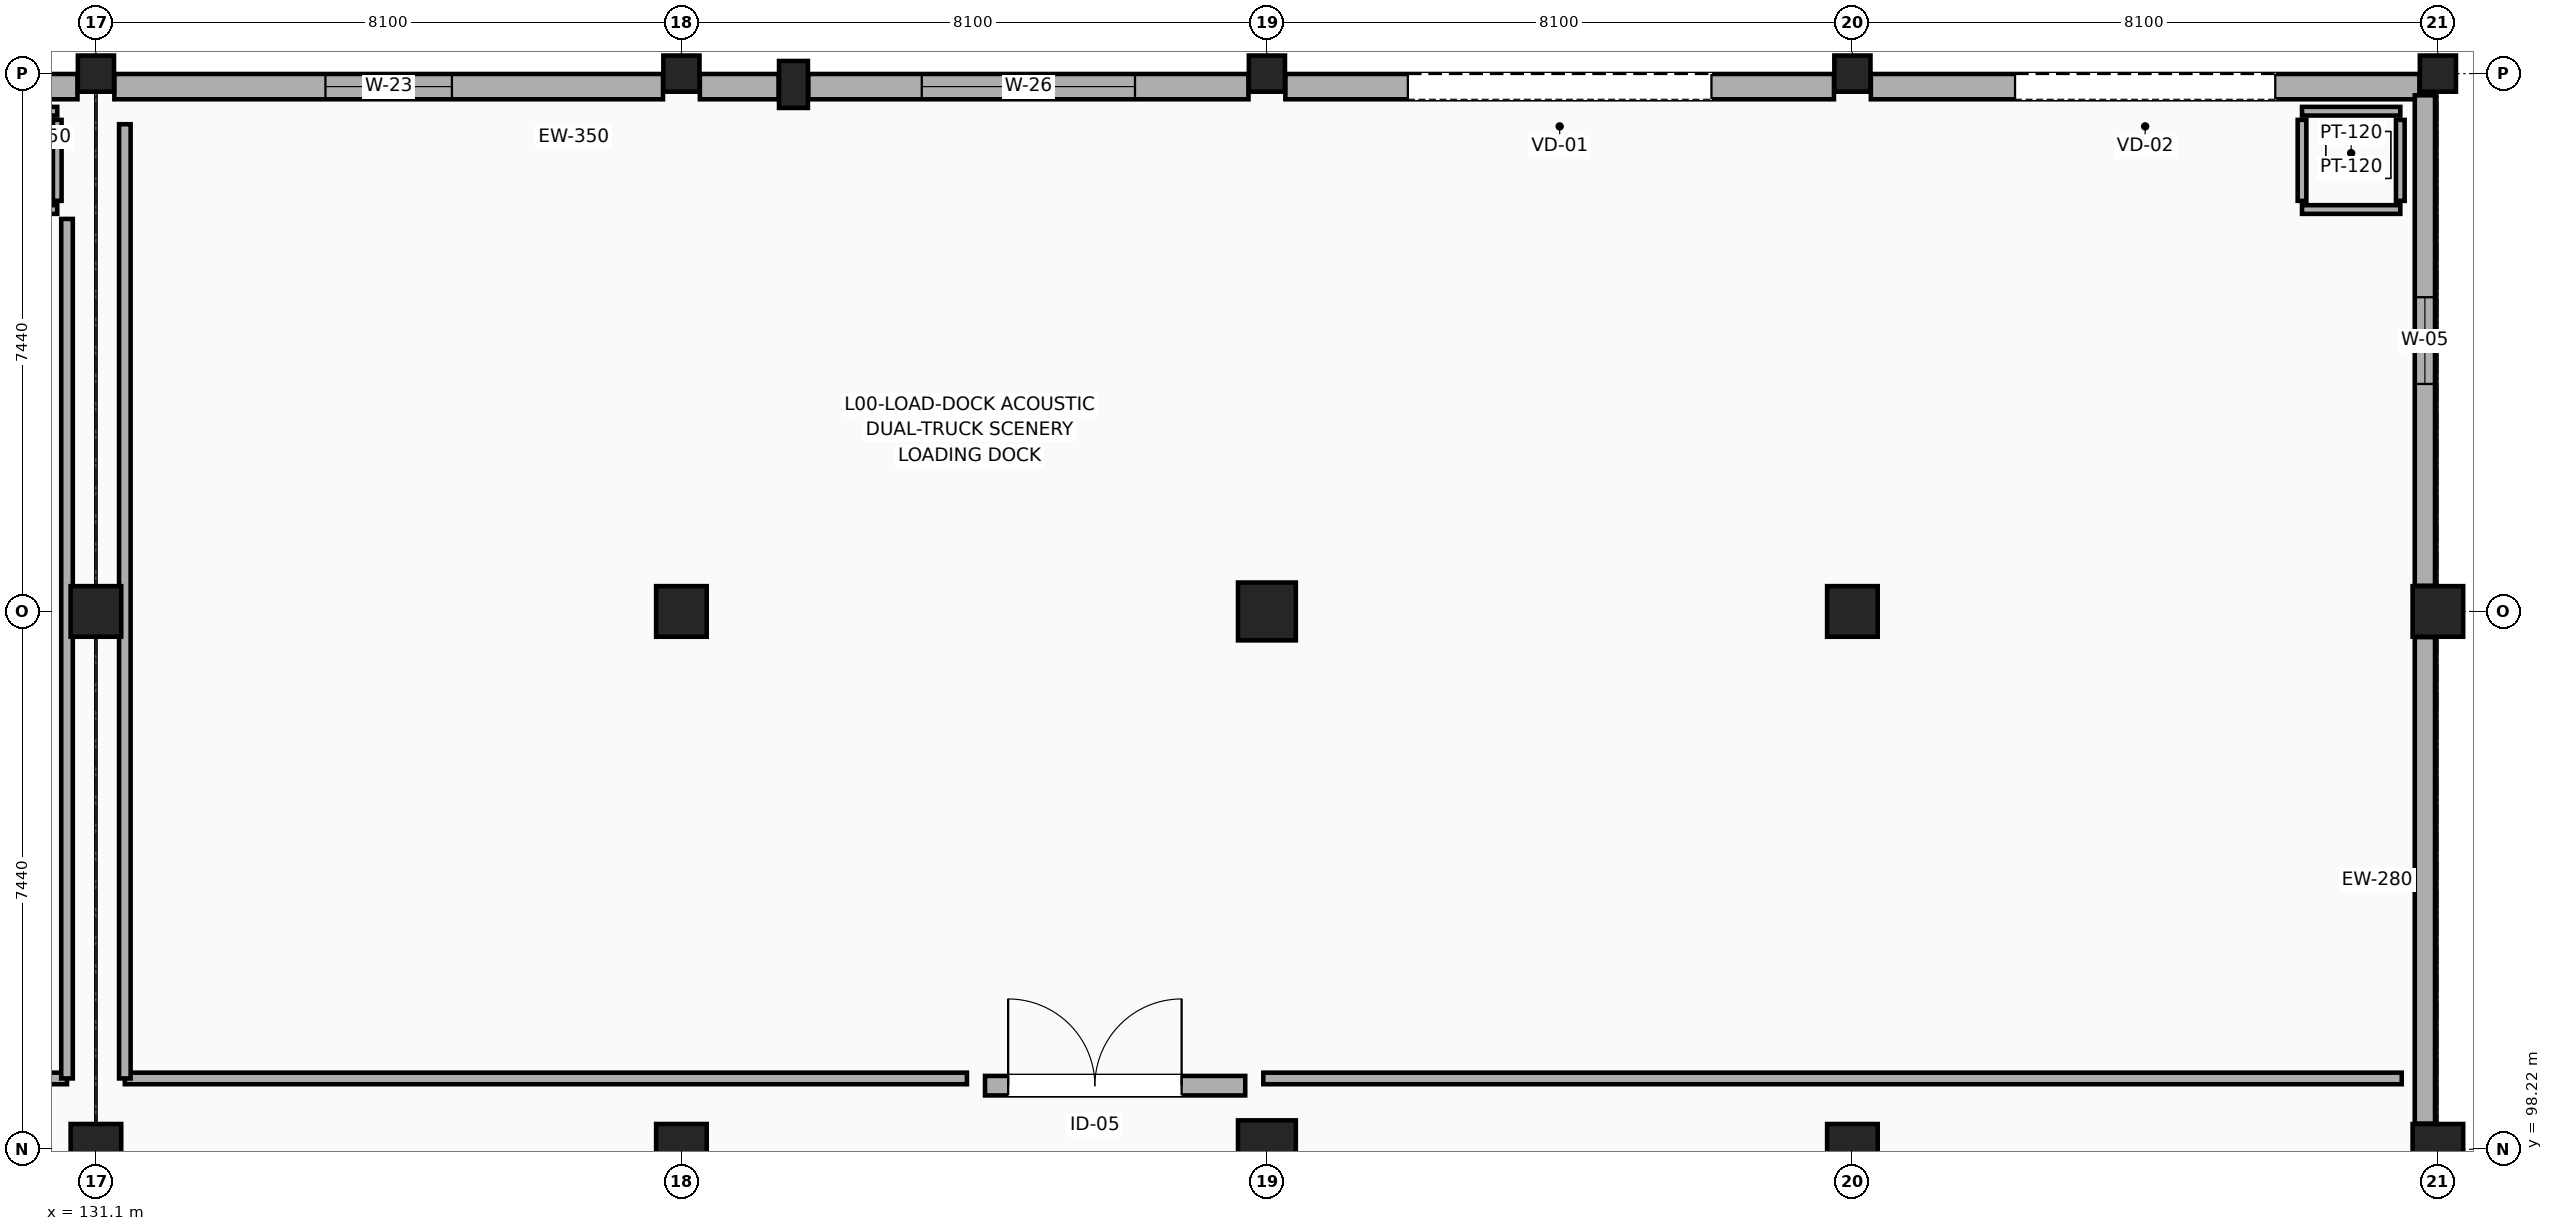
"""IFC4 building model, lengths in metres.
Left out: names, types, materials, properties, quantities, classifications, styles, units other than length and angle.
Written with IfcOpenShell. Run it as: python <this file> out.ifc"""

import sys

from ifc_helpers import new_model, si_unit, direction, frame, frame_2d, origin, origin_2d, place, context, subcontext, project, spatial, rectangle, extrude, element, fill, save


model = new_model("IFC4")
c1 = context("Model", 3, precision=1e-05, world=origin(), true_north=direction((0.0, 1.0)))
c2 = subcontext(c1, "Body", "Model", "MODEL_VIEW")
j1 = project(units=[si_unit("LENGTHUNIT", "METRE"), si_unit("PLANEANGLEUNIT", "RADIAN")], contexts=[c1])
p1 = place(None, origin())
s1 = spatial("IfcSite", under=j1, at=p1, CompositionType="ELEMENT")
p2 = place(p1, origin())
s2 = spatial("IfcBuilding", under=s1, at=p2, CompositionType="ELEMENT")
p3 = place(p2, origin())
s3 = spatial("IfcBuildingStorey", under=s2, at=p3, CompositionType="ELEMENT", Elevation=0.0)
p4 = place(p3, frame((140.75, 112.95, 0.0), z_axis=(0.0, 0.0, 1.0), x_axis=(1.0, 0.0, 0.0)))
e1 = element("IfcColumn", 1, at=p4, inside=s3, PredefinedType="PILASTER", context=c2, shape_type="SweptSolid", body=[
    extrude(rectangle(XDim=0.4, YDim=0.65, at=origin_2d()), origin(), (0.0, 0.0, 1.0), 5.4),
])
for number, where, z_axis, x_axis in (
    (2, (131.1, 98.22, 0.0), (0.0, 0.0, 1.0), (1.0, 0.0, 0.0)),
    (3, (131.1, 105.66, 0.0), (0.0, 0.0, 1.0), (1.0, 0.0, 0.0)),
):
    element("IfcColumn", number, at=place(p3, frame(where, z_axis=z_axis, x_axis=x_axis)), inside=s3, PredefinedType="COLUMN", context=c2, shape_type="SweptSolid", body=[
        extrude(rectangle(XDim=0.7, YDim=0.7, at=origin_2d()), origin(), (0.0, 0.0, 1.0), 5.4),
    ])
p5 = place(p3, frame((131.1, 113.1, 0.0), z_axis=(0.0, 0.0, 1.0), x_axis=(1.0, 0.0, 0.0)))
e4 = element("IfcColumn", 4, at=p5, inside=s3, PredefinedType="COLUMN", context=c2, shape_type="SweptSolid", body=[
    extrude(rectangle(XDim=0.5, YDim=0.5, at=origin_2d()), origin(), (0.0, 0.0, 1.0), 5.4),
])
for number, where, z_axis, x_axis in (
    (5, (139.2, 98.22, 0.0), (0.0, 0.0, 1.0), (1.0, 0.0, 0.0)),
    (6, (139.2, 105.66, 0.0), (0.0, 0.0, 1.0), (1.0, 0.0, 0.0)),
):
    element("IfcColumn", number, at=place(p3, frame(where, z_axis=z_axis, x_axis=x_axis)), inside=s3, PredefinedType="COLUMN", context=c2, shape_type="SweptSolid", body=[
        extrude(rectangle(XDim=0.7, YDim=0.7, at=origin_2d()), origin(), (0.0, 0.0, 1.0), 5.4),
    ])
p6 = place(p3, frame((139.2, 113.1, 0.0), z_axis=(0.0, 0.0, 1.0), x_axis=(1.0, 0.0, 0.0)))
e7 = element("IfcColumn", 7, at=p6, inside=s3, PredefinedType="COLUMN", context=c2, shape_type="SweptSolid", body=[
    extrude(rectangle(XDim=0.5, YDim=0.5, at=origin_2d()), origin(), (0.0, 0.0, 1.0), 5.4),
])
for number, where, z_axis, x_axis in (
    (8, (147.3, 98.22, 0.0), (0.0, 0.0, 1.0), (1.0, 0.0, 0.0)),
    (9, (147.3, 105.66, 0.0), (0.0, 0.0, 1.0), (1.0, 0.0, 0.0)),
):
    element("IfcColumn", number, at=place(p3, frame(where, z_axis=z_axis, x_axis=x_axis)), inside=s3, PredefinedType="COLUMN", context=c2, shape_type="SweptSolid", body=[
        extrude(rectangle(XDim=0.8, YDim=0.8, at=origin_2d()), origin(), (0.0, 0.0, 1.0), 5.4),
    ])
p7 = place(p3, frame((147.3, 113.1, 0.0), z_axis=(0.0, 0.0, 1.0), x_axis=(1.0, 0.0, 0.0)))
e10 = element("IfcColumn", 10, at=p7, inside=s3, PredefinedType="COLUMN", context=c2, shape_type="SweptSolid", body=[
    extrude(rectangle(XDim=0.5, YDim=0.5, at=origin_2d()), origin(), (0.0, 0.0, 1.0), 5.4),
])
for number, where, z_axis, x_axis in (
    (11, (155.4, 98.22, 0.0), (0.0, 0.0, 1.0), (1.0, 0.0, 0.0)),
    (12, (155.4, 105.66, 0.0), (0.0, 0.0, 1.0), (1.0, 0.0, 0.0)),
):
    element("IfcColumn", number, at=place(p3, frame(where, z_axis=z_axis, x_axis=x_axis)), inside=s3, PredefinedType="COLUMN", context=c2, shape_type="SweptSolid", body=[
        extrude(rectangle(XDim=0.7, YDim=0.7, at=origin_2d()), origin(), (0.0, 0.0, 1.0), 5.4),
    ])
p8 = place(p3, frame((155.4, 113.1, 0.0), z_axis=(0.0, 0.0, 1.0), x_axis=(1.0, 0.0, 0.0)))
e13 = element("IfcColumn", 13, at=p8, inside=s3, PredefinedType="COLUMN", context=c2, shape_type="SweptSolid", body=[
    extrude(rectangle(XDim=0.5, YDim=0.5, at=origin_2d()), origin(), (0.0, 0.0, 1.0), 5.4),
])
for number, where, z_axis, x_axis in (
    (14, (163.5, 98.22, 0.0), (0.0, 0.0, 1.0), (1.0, 0.0, 0.0)),
    (15, (163.5, 105.66, 0.0), (0.0, 0.0, 1.0), (1.0, 0.0, 0.0)),
):
    element("IfcColumn", number, at=place(p3, frame(where, z_axis=z_axis, x_axis=x_axis)), inside=s3, PredefinedType="COLUMN", context=c2, shape_type="SweptSolid", body=[
        extrude(rectangle(XDim=0.7, YDim=0.7, at=origin_2d()), origin(), (0.0, 0.0, 1.0), 5.4),
    ])
p9 = place(p3, frame((163.5, 113.1, 0.0), z_axis=(0.0, 0.0, 1.0), x_axis=(1.0, 0.0, 0.0)))
e16 = element("IfcColumn", 16, at=p9, inside=s3, PredefinedType="COLUMN", context=c2, shape_type="SweptSolid", body=[
    extrude(rectangle(XDim=0.5, YDim=0.5, at=origin_2d()), origin(), (0.0, 0.0, 1.0), 5.4),
])
p10 = place(p3, frame((124.78, 112.92, 0.0), z_axis=(0.0, 0.0, 1.0), x_axis=(1.0, 0.0, 0.0)))
e17 = element("IfcWall", 17, at=p10, inside=s3, PredefinedType="SOLIDWALL", context=c2, shape_type="SweptSolid", body=[
    extrude(rectangle(XDim=6.065, YDim=0.35, at=frame_2d((3.032, 0.0))), origin(), (0.0, 0.0, 1.0), 4.137),
])
p11 = place(p10, frame((1.607, 0.0, 0.9)))
e18 = element("IfcOpeningElement", 18, at=p11, cuts=e17, PredefinedType="OPENING", context=c2, shape_type="SweptSolid", body=[
    extrude(rectangle(XDim=2.85, YDim=1.65, at=frame_2d((1.425, 0.825))), frame((0.0, 0.185, 0.0), z_axis=(0.0, -1.0, 0.0), x_axis=(1.0, 0.0, 0.0)), (0.0, 0.0, 1.0), 0.37),
])
p12 = place(p3, frame((131.355, 112.92, 0.0), z_axis=(0.0, 0.0, 1.0), x_axis=(1.0, 0.0, 0.0)))
e19 = element("IfcWall", 19, at=p12, inside=s3, PredefinedType="SOLIDWALL", context=c2, shape_type="SweptSolid", body=[
    extrude(rectangle(XDim=7.59, YDim=0.35, at=frame_2d((3.795, 0.0))), origin(), (0.0, 0.0, 1.0), 4.137),
])
p13 = place(p12, frame((2.92, 0.0, 0.9)))
e20 = element("IfcOpeningElement", 20, at=p13, cuts=e19, PredefinedType="OPENING", context=c2, shape_type="SweptSolid", body=[
    extrude(rectangle(XDim=1.75, YDim=1.8, at=frame_2d((0.875, 0.9))), frame((0.0, 0.185, 0.0), z_axis=(0.0, -1.0, 0.0), x_axis=(1.0, 0.0, 0.0)), (0.0, 0.0, 1.0), 0.37),
])
p14 = place(p3, frame((140.955, 112.92, 0.0), z_axis=(0.0, 0.0, 1.0), x_axis=(1.0, 0.0, 0.0)))
e21 = element("IfcWall", 21, at=p14, inside=s3, PredefinedType="SOLIDWALL", context=c2, shape_type="SweptSolid", body=[
    extrude(rectangle(XDim=6.09, YDim=0.35, at=frame_2d((3.045, 0.0))), origin(), (0.0, 0.0, 1.0), 4.137),
])
p15 = place(p14, frame((1.57, 0.0, 0.9)))
e22 = element("IfcOpeningElement", 22, at=p15, cuts=e21, PredefinedType="OPENING", context=c2, shape_type="SweptSolid", body=[
    extrude(rectangle(XDim=2.95, YDim=1.95, at=frame_2d((1.475, 0.975))), frame((0.0, 0.185, 0.0), z_axis=(0.0, -1.0, 0.0), x_axis=(1.0, 0.0, 0.0)), (0.0, 0.0, 1.0), 0.37),
])
p16 = place(p3, frame((139.455, 112.92, 0.0), z_axis=(0.0, 0.0, 1.0), x_axis=(1.0, 0.0, 0.0)))
e23 = element("IfcWall", 23, at=p16, inside=s3, PredefinedType="SOLIDWALL", context=c2, shape_type="SweptSolid", body=[
    extrude(rectangle(XDim=1.09, YDim=0.35, at=frame_2d((0.545, 0.0))), origin(), (0.0, 0.0, 1.0), 4.137),
])
p17 = place(p3, frame((147.555, 112.92, 0.0), z_axis=(0.0, 0.0, 1.0), x_axis=(1.0, 0.0, 0.0)))
e24 = element("IfcWall", 24, at=p17, inside=s3, PredefinedType="SOLIDWALL", context=c2, shape_type="SweptSolid", body=[
    extrude(rectangle(XDim=7.59, YDim=0.35, at=frame_2d((3.795, 0.0))), origin(), (0.0, 0.0, 1.0), 4.137),
])
p18 = place(p17, frame((1.695, 0.0, 0.0)))
e25 = element("IfcOpeningElement", 25, at=p18, cuts=e24, PredefinedType="OPENING", context=c2, shape_type="SweptSolid", body=[
    extrude(rectangle(XDim=4.2, YDim=3.6, at=frame_2d((2.1, 1.8))), frame((0.0, 0.185, 0.0), z_axis=(0.0, -1.0, 0.0), x_axis=(1.0, 0.0, 0.0)), (0.0, 0.0, 1.0), 0.37),
])
p19 = place(p3, frame((155.655, 112.92, 0.0), z_axis=(0.0, 0.0, 1.0), x_axis=(1.0, 0.0, 0.0)))
e26 = element("IfcWall", 26, at=p19, inside=s3, PredefinedType="SOLIDWALL", context=c2, shape_type="SweptSolid", body=[
    extrude(rectangle(XDim=7.59, YDim=0.35, at=frame_2d((3.795, 0.0))), origin(), (0.0, 0.0, 1.0), 4.137),
])
p20 = place(p19, frame((1.995, 0.0, 0.0)))
e27 = element("IfcOpeningElement", 27, at=p20, cuts=e26, PredefinedType="OPENING", context=c2, shape_type="SweptSolid", body=[
    extrude(rectangle(XDim=3.6, YDim=3.4, at=frame_2d((1.8, 1.7))), frame((0.0, 0.185, 0.0), z_axis=(0.0, -1.0, 0.0), x_axis=(1.0, 0.0, 0.0)), (0.0, 0.0, 1.0), 0.37),
])
p21 = place(p3, frame((163.32, 98.575, 0.0), z_axis=(0.0, 0.0, 1.0), x_axis=(0.0, 1.0, 0.0)))
e28 = element("IfcWall", 28, at=p21, inside=s3, PredefinedType="SOLIDWALL", context=c2, shape_type="SweptSolid", body=[
    extrude(rectangle(XDim=6.73, YDim=0.28, at=frame_2d((3.365, 0.0))), origin(), (0.0, 0.0, 1.0), 4.787),
])
p22 = place(p3, frame((163.32, 106.015, 0.0), z_axis=(0.0, 0.0, 1.0), x_axis=(0.0, 1.0, 0.0)))
e29 = element("IfcWall", 29, at=p22, inside=s3, PredefinedType="SOLIDWALL", context=c2, shape_type="SweptSolid", body=[
    extrude(rectangle(XDim=6.785, YDim=0.28, at=frame_2d((3.393, 0.0))), origin(), (0.0, 0.0, 1.0), 4.787),
])
p23 = place(p22, frame((2.792, 0.0, 0.95)))
e30 = element("IfcOpeningElement", 30, at=p23, cuts=e29, PredefinedType="OPENING", context=c2, shape_type="SweptSolid", body=[
    extrude(rectangle(XDim=1.2, YDim=1.8, at=frame_2d((0.6, 0.9))), frame((0.0, 0.15, 0.0), z_axis=(0.0, -1.0, 0.0), x_axis=(1.0, 0.0, 0.0)), (0.0, 0.0, 1.0), 0.3),
])
for number, where, z_axis, x_axis in (
    (31, (129.205, 111.22, 0.0), (0.0, 0.0, 1.0), (1.0, 0.0, 0.0)),
    (32, (129.205, 112.58, 0.0), (0.0, 0.0, 1.0), (1.0, 0.0, 0.0)),
):
    element("IfcWall", number, at=place(p3, frame(where, z_axis=z_axis, x_axis=x_axis)), inside=s3, PredefinedType="PARTITIONING", context=c2, shape_type="SweptSolid", body=[
        extrude(rectangle(XDim=1.36, YDim=0.12, at=frame_2d((0.68, 0.0))), origin(), (0.0, 0.0, 1.0), 5.085),
    ])
p24 = place(p3, frame((130.565, 111.34, 0.0), z_axis=(0.0, 0.0, 1.0), x_axis=(0.0, 1.0, 0.0)))
e33 = element("IfcWall", 33, at=p24, inside=s3, PredefinedType="PARTITIONING", context=c2, shape_type="SweptSolid", body=[
    extrude(rectangle(XDim=1.12, YDim=0.12, at=frame_2d((0.56, 0.0))), origin(), (0.0, 0.0, 1.0), 5.085),
])
for number, where, z_axis, x_axis in (
    (34, (161.62, 111.22, 0.0), (0.0, 0.0, 1.0), (1.0, 0.0, 0.0)),
    (35, (161.62, 112.58, 0.0), (0.0, 0.0, 1.0), (1.0, 0.0, 0.0)),
):
    element("IfcWall", number, at=place(p3, frame(where, z_axis=z_axis, x_axis=x_axis)), inside=s3, PredefinedType="PARTITIONING", context=c2, shape_type="SweptSolid", body=[
        extrude(rectangle(XDim=1.36, YDim=0.12, at=frame_2d((0.68, 0.0))), origin(), (0.0, 0.0, 1.0), 5.085),
    ])
for number, where, z_axis, x_axis in (
    (36, (161.62, 111.34, 0.0), (0.0, 0.0, 1.0), (0.0, 1.0, 0.0)),
    (37, (162.98, 111.34, 0.0), (0.0, 0.0, 1.0), (0.0, 1.0, 0.0)),
):
    element("IfcWall", number, at=place(p3, frame(where, z_axis=z_axis, x_axis=x_axis)), inside=s3, PredefinedType="PARTITIONING", context=c2, shape_type="SweptSolid", body=[
        extrude(rectangle(XDim=1.12, YDim=0.12, at=frame_2d((0.56, 0.0))), origin(), (0.0, 0.0, 1.0), 5.085),
    ])
p25 = place(p3, frame((143.4, 99.1, 0.0), z_axis=(0.0, 0.0, 1.0), x_axis=(1.0, 0.0, 0.0)))
e38 = element("IfcWall", 38, at=p25, inside=s3, PredefinedType="SOLIDWALL", context=c2, shape_type="SweptSolid", body=[
    extrude(rectangle(XDim=3.6, YDim=0.27, at=frame_2d((1.8, 0.0))), origin(), (0.0, 0.0, 1.0), 4.687),
])
p26 = place(p25, frame((0.32, 0.0, 0.0)))
e39 = element("IfcOpeningElement", 39, at=p26, cuts=e38, PredefinedType="OPENING", context=c2, shape_type="SweptSolid", body=[
    extrude(rectangle(XDim=2.4, YDim=2.8, at=frame_2d((1.2, 1.4))), frame((0.0, 0.145, 0.0), z_axis=(0.0, -1.0, 0.0), x_axis=(1.0, 0.0, 0.0)), (0.0, 0.0, 1.0), 0.29),
])
p27 = place(p3, frame((119.6, 99.2, 0.0), z_axis=(0.0, 0.0, 1.0), x_axis=(1.0, 0.0, 0.0)))
e40 = element("IfcWall", 40, at=p27, inside=s3, PredefinedType="PARTITIONING", context=c2, shape_type="SweptSolid", body=[
    extrude(rectangle(XDim=11.1, YDim=0.16, at=frame_2d((5.55, 0.0))), origin(), (0.0, 0.0, 1.0), 4.337),
])
p28 = place(p3, frame((130.7, 99.2, 0.0), z_axis=(0.0, 0.0, 1.0), x_axis=(0.0, 1.0, 0.0)))
e41 = element("IfcWall", 41, at=p28, inside=s3, PredefinedType="PARTITIONING", context=c2, shape_type="SweptSolid", body=[
    extrude(rectangle(XDim=11.89, YDim=0.16, at=frame_2d((5.945, 0.0))), origin(), (0.0, 0.0, 1.0), 4.137),
])
p29 = place(p3, frame((131.5, 99.2, 0.0), z_axis=(0.0, 0.0, 1.0), x_axis=(1.0, 0.0, 0.0)))
e42 = element("IfcWall", 42, at=p29, inside=s3, PredefinedType="PARTITIONING", context=c2, shape_type="SweptSolid", body=[
    extrude(rectangle(XDim=11.65, YDim=0.16, at=frame_2d((5.825, 0.0))), origin(), (0.0, 0.0, 1.0), 4.337),
])
p30 = place(p3, frame((147.25, 99.2, 0.0), z_axis=(0.0, 0.0, 1.0), x_axis=(1.0, 0.0, 0.0)))
e43 = element("IfcWall", 43, at=p30, inside=s3, PredefinedType="PARTITIONING", context=c2, shape_type="SweptSolid", body=[
    extrude(rectangle(XDim=15.75, YDim=0.16, at=frame_2d((7.875, 0.0))), origin(), (0.0, 0.0, 1.0), 4.337),
])
p31 = place(p3, frame((131.5, 99.2, 0.0), z_axis=(0.0, 0.0, 1.0), x_axis=(0.0, 1.0, 0.0)))
e44 = element("IfcWall", 44, at=p31, inside=s3, PredefinedType="PARTITIONING", context=c2, shape_type="SweptSolid", body=[
    extrude(rectangle(XDim=13.2, YDim=0.16, at=frame_2d((6.6, 0.0))), origin(), (0.0, 0.0, 1.0), 4.137),
])
p32 = place(p13, origin())
e45 = element("IfcWindow", 45, at=p32, inside=s3, PartitioningType="SINGLE_PANEL", PredefinedType="WINDOW", context=c2, shape_type="SweptSolid", body=[
    extrude(rectangle(XDim=1.75, YDim=1.8, at=frame_2d((0.875, 0.9))), frame((0.0, 0.03, 0.0), z_axis=(0.0, -1.0, 0.0), x_axis=(1.0, 0.0, 0.0)), (0.0, 0.0, 1.0), 0.06),
])
fill(e20, e45)
p33 = place(p15, origin())
e46 = element("IfcWindow", 46, at=p33, inside=s3, PartitioningType="SINGLE_PANEL", PredefinedType="WINDOW", context=c2, shape_type="SweptSolid", body=[
    extrude(rectangle(XDim=2.95, YDim=1.95, at=frame_2d((1.475, 0.975))), frame((0.0, 0.03, 0.0), z_axis=(0.0, -1.0, 0.0), x_axis=(1.0, 0.0, 0.0)), (0.0, 0.0, 1.0), 0.06),
])
fill(e22, e46)
p34 = place(p18, origin())
e47 = element("IfcDoor", 47, at=p34, inside=s3, OperationType="ROLLINGUP", PredefinedType="GATE", context=c2, shape_type="SweptSolid", body=[
    extrude(rectangle(XDim=4.2, YDim=3.6, at=frame_2d((2.1, 1.8))), frame((0.0, 0.025, 0.0), z_axis=(0.0, -1.0, 0.0), x_axis=(1.0, 0.0, 0.0)), (0.0, 0.0, 1.0), 0.05),
])
fill(e25, e47)
p35 = place(p20, origin())
e48 = element("IfcDoor", 48, at=p35, inside=s3, OperationType="ROLLINGUP", PredefinedType="GATE", context=c2, shape_type="SweptSolid", body=[
    extrude(rectangle(XDim=3.6, YDim=3.4, at=frame_2d((1.8, 1.7))), frame((0.0, 0.025, 0.0), z_axis=(0.0, -1.0, 0.0), x_axis=(1.0, 0.0, 0.0)), (0.0, 0.0, 1.0), 0.05),
])
fill(e27, e48)
p36 = place(p23, origin())
e49 = element("IfcWindow", 49, at=p36, inside=s3, PartitioningType="SINGLE_PANEL", PredefinedType="WINDOW", context=c2, shape_type="SweptSolid", body=[
    extrude(rectangle(XDim=1.2, YDim=1.8, at=frame_2d((0.6, 0.9))), frame((0.0, 0.03, 0.0), z_axis=(0.0, -1.0, 0.0), x_axis=(1.0, 0.0, 0.0)), (0.0, 0.0, 1.0), 0.06),
])
fill(e30, e49)
p37 = place(p26, origin())
e50 = element("IfcDoor", 50, at=p37, inside=s3, OperationType="DOUBLE_DOOR_SINGLE_SWING", PredefinedType="DOOR", context=c2, shape_type="SweptSolid", body=[
    extrude(rectangle(XDim=2.4, YDim=2.8, at=frame_2d((1.2, 1.4))), frame((0.0, 0.025, 0.0), z_axis=(0.0, -1.0, 0.0), x_axis=(1.0, 0.0, 0.0)), (0.0, 0.0, 1.0), 0.05),
])
fill(e39, e50)
save(model, sys.argv[1])
